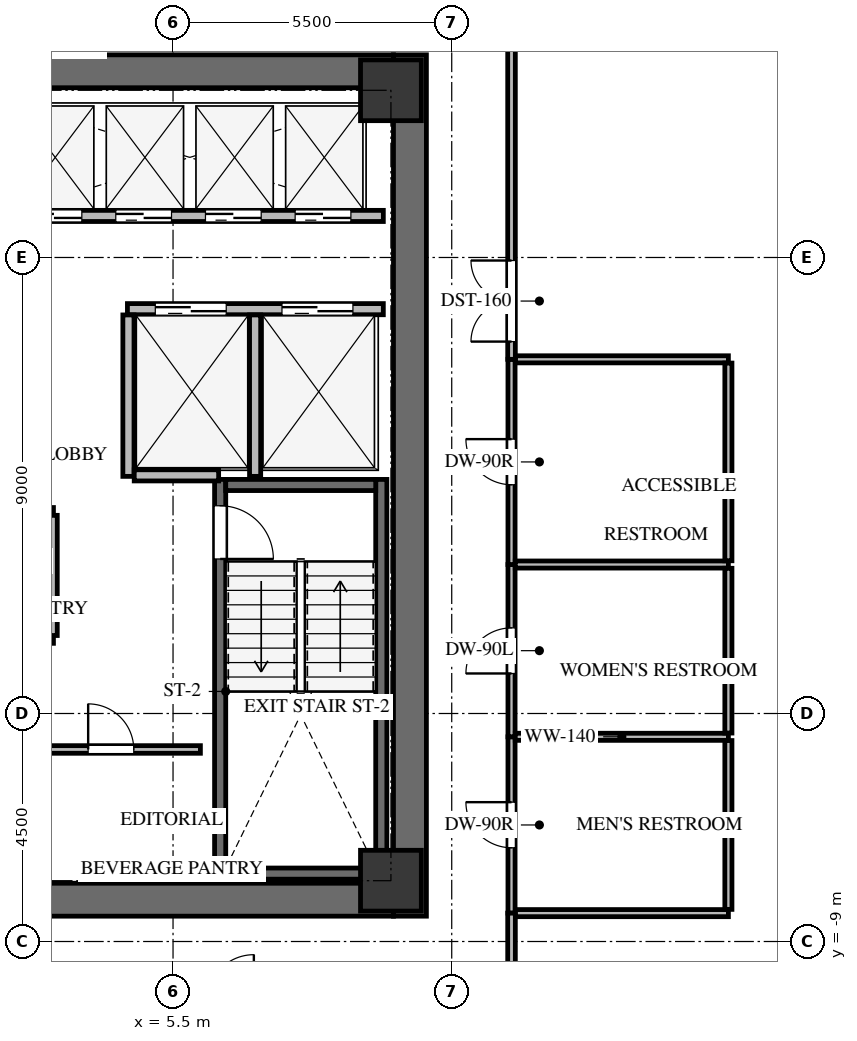
"""IFC4 building model, lengths in metres.
Left out: names, types, materials, properties, quantities, classifications, styles, units other than length and angle.
Written with IfcOpenShell. Run it as: python <this file> out.ifc"""

import sys

from ifc_helpers import new_model, si_unit, direction, frame, frame_2d, origin, origin_2d, place, context, subcontext, project, spatial, rectangle, extrude, source, transform, mapped, element, fill, save


model = new_model("IFC4")
c1 = context("Model", 3, precision=1e-05, world=origin(), true_north=direction((0.0, 1.0)))
c2 = subcontext(c1, "Body", "Model", "MODEL_VIEW")
j1 = project(units=[si_unit("LENGTHUNIT", "METRE"), si_unit("PLANEANGLEUNIT", "RADIAN")], contexts=[c1])
p1 = place(None, origin())
s1 = spatial("IfcSite", under=j1, at=p1, CompositionType="ELEMENT")
p2 = place(p1, origin())
s2 = spatial("IfcBuilding", under=s1, at=p2, CompositionType="ELEMENT")
p3 = place(p2, frame((0.0, 0.0, 170.5)))
s3 = spatial("IfcBuildingStorey", under=s2, at=p3, CompositionType="ELEMENT", Elevation=170.5)
p4 = place(p3, frame((10.175, -8.5, 0.0), z_axis=(0.0, 0.0, 1.0), x_axis=(0.0, 1.0, 0.0)))
e1 = element("IfcWall", 1, at=p4, inside=s3, PredefinedType="SHEAR", context=c2, shape_type="SweptSolid", body=[
    extrude(rectangle(XDim=17.0, YDim=0.65, at=frame_2d((8.5, 0.0))), origin(), (0.0, 0.0, 1.0), 3.3),
])
p5 = place(p3, frame((2.1, -8.175, 0.0), z_axis=(0.0, 0.0, 1.0), x_axis=(1.0, 0.0, 0.0)))
e2 = element("IfcWall", 2, at=p5, inside=s3, PredefinedType="SHEAR", context=c2, shape_type="SweptSolid", body=[
    extrude(rectangle(XDim=7.75, YDim=0.65, at=frame_2d((3.875, 0.0))), origin(), (0.0, 0.0, 1.0), 3.3),
])
p6 = place(p3, frame((-9.85, 8.175, 0.0), z_axis=(0.0, 0.0, 1.0), x_axis=(1.0, 0.0, 0.0)))
e3 = element("IfcWall", 3, at=p6, inside=s3, PredefinedType="SHEAR", context=c2, shape_type="SweptSolid", body=[
    extrude(rectangle(XDim=19.7, YDim=0.65, at=frame_2d((9.85, 0.0))), origin(), (0.0, 0.0, 1.0), 3.3),
])
p7 = place(p3, frame((9.61, -7.77, -0.24), z_axis=(0.0, 0.0, 1.0), x_axis=(0.0, 1.0, 0.0)))
e4 = element("IfcWall", 4, at=p7, inside=s3, PredefinedType="SHEAR", context=c2, shape_type="SweptSolid", body=[
    extrude(rectangle(XDim=7.89, YDim=0.22, at=frame_2d((3.945, 0.0))), origin(), (0.0, 0.0, 1.0), 3.3),
])
p8 = place(p3, frame((6.43, 0.12, -0.24), z_axis=(0.0, 0.0, 1.0), x_axis=(0.0, -1.0, 0.0)))
e5 = element("IfcWall", 5, at=p8, inside=s3, PredefinedType="SHEAR", context=c2, shape_type="SweptSolid", body=[
    extrude(rectangle(XDim=7.89, YDim=0.22, at=frame_2d((3.945, 0.0))), origin(), (0.0, 0.0, 1.0), 3.3),
])
p9 = place(p8, frame((0.52, 0.0, 0.0)))
e6 = element("IfcOpeningElement", 6, at=p9, cuts=e5, PredefinedType="OPENING", context=c2, shape_type="SweptSolid", body=[
    extrude(rectangle(XDim=1.05, YDim=2.15, at=frame_2d((0.525, 1.075))), frame((0.0, 0.12, 0.0), z_axis=(0.0, -1.0, 0.0), x_axis=(1.0, 0.0, 0.0)), (0.0, 0.0, 1.0), 0.24),
])
for number, where, z_axis, x_axis in (
    (7, (6.54, -7.66, -0.24), (0.0, 0.0, 1.0), (1.0, 0.0, 0.0)),
    (8, (9.5, 0.01, -0.24), (0.0, 0.0, 1.0), (-1.0, 0.0, 0.0)),
):
    element("IfcWall", number, at=place(p3, frame(where, z_axis=z_axis, x_axis=x_axis)), inside=s3, PredefinedType="SHEAR", context=c2, shape_type="SweptSolid", body=[
        extrude(rectangle(XDim=2.96, YDim=0.22, at=frame_2d((1.48, 0.0))), origin(), (0.0, 0.0, 1.0), 3.3),
    ])
m1 = source(origin(), c2, "Body", "SweptSolid", [
    extrude(rectangle(XDim=1.2, YDim=1.2, at=origin_2d()), origin(), (0.0, 0.0, 1.0), 3.3),
])
for number, where, z_axis, x_axis in (
    (9, (9.8, -7.8, -0.24), (0.0, 0.0, 1.0), (1.0, 0.0, 0.0)),
    (10, (9.8, 7.8, -0.24), (0.0, 0.0, 1.0), (1.0, 0.0, 0.0)),
):
    element("IfcColumn", number, at=place(p3, frame(where, z_axis=z_axis, x_axis=x_axis)), inside=s3, PredefinedType="COLUMN", context=c2, shape_type="MappedRepresentation", body=[
        mapped(m1, transform((0.0, 0.0, 0.0), x_axis=(1.0, 0.0, 0.0), y_axis=(0.0, 1.0, 0.0), z_axis=(0.0, 0.0, 1.0), scale=1.0)),
    ])
p10 = place(p3, frame((4.6, 3.48, 0.0), z_axis=(0.0, 0.0, 1.0), x_axis=(1.0, 0.0, 0.0)))
e11 = element("IfcWall", 11, at=p10, inside=s3, PredefinedType="SOLIDWALL", context=c2, shape_type="SweptSolid", body=[
    extrude(rectangle(XDim=5.05, YDim=0.22, at=frame_2d((2.525, 0.0))), origin(), (0.0, 0.0, 1.0), 3.045),
])
p11 = place(p10, frame((0.55, 0.0, 0.0)))
e12 = element("IfcOpeningElement", 12, at=p11, cuts=e11, PredefinedType="OPENING", context=c2, shape_type="SweptSolid", body=[
    extrude(rectangle(XDim=1.4, YDim=2.15, at=frame_2d((0.7, 1.075))), frame((0.0, 0.12, 0.0), z_axis=(0.0, -1.0, 0.0), x_axis=(1.0, 0.0, 0.0)), (0.0, 0.0, 1.0), 0.24),
])
p12 = place(p10, frame((3.05, 0.0, 0.0)))
e13 = element("IfcOpeningElement", 13, at=p12, cuts=e11, PredefinedType="OPENING", context=c2, shape_type="SweptSolid", body=[
    extrude(rectangle(XDim=1.4, YDim=2.15, at=frame_2d((0.7, 1.075))), frame((0.0, 0.12, 0.0), z_axis=(0.0, -1.0, 0.0), x_axis=(1.0, 0.0, 0.0)), (0.0, 0.0, 1.0), 0.24),
])
for number, where, z_axis, x_axis in (
    (14, (4.62, 0.18, 0.0), (0.0, 0.0, 1.0), (0.0, 1.0, 0.0)),
    (15, (7.12, 0.18, 0.0), (0.0, 0.0, 1.0), (0.0, 1.0, 0.0)),
):
    element("IfcWall", number, at=place(p3, frame(where, z_axis=z_axis, x_axis=x_axis)), inside=s3, PredefinedType="SOLIDWALL", context=c2, shape_type="SweptSolid", body=[
        extrude(rectangle(XDim=3.186, YDim=0.22, at=frame_2d((1.593, 0.0))), origin(), (0.0, 0.0, 1.0), 3.045),
    ])
p13 = place(p3, frame((4.734, 0.2, 0.0), z_axis=(0.0, 0.0, 1.0), x_axis=(1.0, 0.0, 0.0)))
e16 = element("IfcWall", 16, at=p13, inside=s3, PredefinedType="SOLIDWALL", context=c2, shape_type="SweptSolid", body=[
    extrude(rectangle(XDim=1.666, YDim=0.22, at=frame_2d((0.833, 0.0))), origin(), (0.0, 0.0, 1.0), 3.045),
])
p14 = place(p3, frame((2.325, 5.32, 0.0), z_axis=(0.0, 0.0, 1.0), x_axis=(1.0, 0.0, 0.0)))
e17 = element("IfcWall", 17, at=p14, inside=s3, PredefinedType="SOLIDWALL", context=c2, shape_type="SweptSolid", body=[
    extrude(rectangle(XDim=7.325, YDim=0.22, at=frame_2d((3.663, 0.0))), origin(), (0.0, 0.0, 1.0), 3.045),
])
p15 = place(p14, frame((0.275, 0.0, 0.0)))
e18 = element("IfcOpeningElement", 18, at=p15, cuts=e17, PredefinedType="OPENING", context=c2, shape_type="SweptSolid", body=[
    extrude(rectangle(XDim=1.1, YDim=2.15, at=frame_2d((0.55, 1.075))), frame((0.0, 0.12, 0.0), z_axis=(0.0, -1.0, 0.0), x_axis=(1.0, 0.0, 0.0)), (0.0, 0.0, 1.0), 0.24),
])
p16 = place(p14, frame((2.045, 0.0, 0.0)))
e19 = element("IfcOpeningElement", 19, at=p16, cuts=e17, PredefinedType="OPENING", context=c2, shape_type="SweptSolid", body=[
    extrude(rectangle(XDim=1.1, YDim=2.15, at=frame_2d((0.55, 1.075))), frame((0.0, 0.12, 0.0), z_axis=(0.0, -1.0, 0.0), x_axis=(1.0, 0.0, 0.0)), (0.0, 0.0, 1.0), 0.24),
])
p17 = place(p14, frame((3.815, 0.0, 0.0)))
e20 = element("IfcOpeningElement", 20, at=p17, cuts=e17, PredefinedType="OPENING", context=c2, shape_type="SweptSolid", body=[
    extrude(rectangle(XDim=1.1, YDim=2.15, at=frame_2d((0.55, 1.075))), frame((0.0, 0.12, 0.0), z_axis=(0.0, -1.0, 0.0), x_axis=(1.0, 0.0, 0.0)), (0.0, 0.0, 1.0), 0.24),
])
p18 = place(p14, frame((5.585, 0.0, 0.0)))
e21 = element("IfcOpeningElement", 21, at=p18, cuts=e17, PredefinedType="OPENING", context=c2, shape_type="SweptSolid", body=[
    extrude(rectangle(XDim=1.1, YDim=2.15, at=frame_2d((0.55, 1.075))), frame((0.0, 0.12, 0.0), z_axis=(0.0, -1.0, 0.0), x_axis=(1.0, 0.0, 0.0)), (0.0, 0.0, 1.0), 0.24),
])
p19 = place(p3, frame((2.51, -5.21, 0.0), z_axis=(0.0, 0.0, 1.0), x_axis=(1.0, 0.0, 0.0)))
e22 = element("IfcWall", 22, at=p19, inside=s3, PredefinedType="PARTITIONING", context=c2, shape_type="SweptSolid", body=[
    extrude(rectangle(XDim=3.53, YDim=0.15, at=frame_2d((1.765, 0.0))), origin(), (0.0, 0.0, 1.0), 3.045),
])
p20 = place(p19, frame((1.315, 0.0, 0.0)))
e23 = element("IfcOpeningElement", 23, at=p20, cuts=e22, PredefinedType="OPENING", context=c2, shape_type="SweptSolid", body=[
    extrude(rectangle(XDim=0.9, YDim=2.05, at=frame_2d((0.45, 1.025))), frame((0.0, 0.085, 0.0), z_axis=(0.0, -1.0, 0.0), x_axis=(1.0, 0.0, 0.0)), (0.0, 0.0, 1.0), 0.17),
])
p21 = place(p3, frame((3.14, -3.04, 0.0), z_axis=(0.0, 0.0, 1.0), x_axis=(-1.0, 0.0, 0.0)))
e24 = element("IfcWall", 24, at=p21, inside=s3, PredefinedType="PARTITIONING", context=c2, shape_type="SweptSolid", body=[
    extrude(rectangle(XDim=7.48, YDim=0.15, at=frame_2d((3.74, 0.0))), origin(), (0.0, 0.0, 1.0), 3.045),
])
p22 = place(p21, frame((3.29, 0.0, 0.0)))
e25 = element("IfcOpeningElement", 25, at=p22, cuts=e24, PredefinedType="OPENING", context=c2, shape_type="SweptSolid", body=[
    extrude(rectangle(XDim=0.9, YDim=2.05, at=frame_2d((0.45, 1.025))), frame((0.0, 0.085, 0.0), z_axis=(0.0, -1.0, 0.0), x_axis=(1.0, 0.0, 0.0)), (0.0, 0.0, 1.0), 0.17),
])
p23 = place(p3, frame((-4.34, -0.51, 0.0), z_axis=(0.0, 0.0, 1.0), x_axis=(1.0, 0.0, 0.0)))
e26 = element("IfcWall", 26, at=p23, inside=s3, PredefinedType="PARTITIONING", context=c2, shape_type="SweptSolid", body=[
    extrude(rectangle(XDim=7.48, YDim=0.15, at=frame_2d((3.74, 0.0))), origin(), (0.0, 0.0, 1.0), 3.045),
])
p24 = place(p3, frame((3.14, -0.589, 0.0), z_axis=(0.0, 0.0, 1.0), x_axis=(0.0, -1.0, 0.0)))
e27 = element("IfcWall", 27, at=p24, inside=s3, PredefinedType="PARTITIONING", context=c2, shape_type="SweptSolid", body=[
    extrude(rectangle(XDim=2.372, YDim=0.15, at=frame_2d((1.186, 0.0))), origin(), (0.0, 0.0, 1.0), 3.045),
])
p25 = place(p3, frame((12.18, -8.44, 0.0), z_axis=(0.0, 0.0, 1.0), x_axis=(0.0, 1.0, 0.0)))
e28 = element("IfcWall", 28, at=p25, inside=s3, PredefinedType="PARTITIONING", context=c2, shape_type="SweptSolid", body=[
    extrude(rectangle(XDim=3.48, YDim=0.14, at=frame_2d((1.74, 0.0))), origin(), (0.0, 0.0, 1.0), 3.045),
])
p26 = place(p25, frame((1.29, 0.0, 0.0)))
e29 = element("IfcOpeningElement", 29, at=p26, cuts=e28, PredefinedType="OPENING", context=c2, shape_type="SweptSolid", body=[
    extrude(rectangle(XDim=0.9, YDim=2.05, at=frame_2d((0.45, 1.025))), frame((0.0, 0.08, 0.0), z_axis=(0.0, -1.0, 0.0), x_axis=(1.0, 0.0, 0.0)), (0.0, 0.0, 1.0), 0.16),
])
p27 = place(p3, frame((12.18, -4.96, 0.0), z_axis=(0.0, 0.0, 1.0), x_axis=(0.0, 1.0, 0.0)))
e30 = element("IfcWall", 30, at=p27, inside=s3, PredefinedType="PARTITIONING", context=c2, shape_type="SweptSolid", body=[
    extrude(rectangle(XDim=3.4, YDim=0.14, at=frame_2d((1.7, 0.0))), origin(), (0.0, 0.0, 1.0), 3.045),
])
p28 = place(p27, frame((1.25, 0.0, 0.0)))
e31 = element("IfcOpeningElement", 31, at=p28, cuts=e30, PredefinedType="OPENING", context=c2, shape_type="SweptSolid", body=[
    extrude(rectangle(XDim=0.9, YDim=2.05, at=frame_2d((0.45, 1.025))), frame((0.0, 0.08, 0.0), z_axis=(0.0, -1.0, 0.0), x_axis=(1.0, 0.0, 0.0)), (0.0, 0.0, 1.0), 0.16),
])
p29 = place(p3, frame((12.18, -1.56, 0.0), z_axis=(0.0, 0.0, 1.0), x_axis=(0.0, 1.0, 0.0)))
e32 = element("IfcWall", 32, at=p29, inside=s3, PredefinedType="PARTITIONING", context=c2, shape_type="SweptSolid", body=[
    extrude(rectangle(XDim=4.05, YDim=0.14, at=frame_2d((2.025, 0.0))), origin(), (0.0, 0.0, 1.0), 2.242),
])
p30 = place(p29, frame((1.575, 0.0, 0.0)))
e33 = element("IfcOpeningElement", 33, at=p30, cuts=e32, PredefinedType="OPENING", context=c2, shape_type="SweptSolid", body=[
    extrude(rectangle(XDim=0.9, YDim=2.05, at=frame_2d((0.45, 1.025))), frame((0.0, 0.08, 0.0), z_axis=(0.0, -1.0, 0.0), x_axis=(1.0, 0.0, 0.0)), (0.0, 0.0, 1.0), 0.16),
])
p31 = place(p3, frame((12.18, 2.49, 0.0), z_axis=(0.0, 0.0, 1.0), x_axis=(0.0, 1.0, 0.0)))
e34 = element("IfcWall", 34, at=p31, inside=s3, PredefinedType="PARTITIONING", context=c2, shape_type="SweptSolid", body=[
    extrude(rectangle(XDim=7.611, YDim=0.15, at=frame_2d((3.806, 0.0))), origin(), (0.0, 0.0, 1.0), 3.045),
])
p32 = place(p31, frame((0.35, 0.0, 0.0)))
e35 = element("IfcOpeningElement", 35, at=p32, cuts=e34, PredefinedType="OPENING", context=c2, shape_type="SweptSolid", body=[
    extrude(rectangle(XDim=1.6, YDim=2.15, at=frame_2d((0.8, 1.075))), frame((0.0, 0.085, 0.0), z_axis=(0.0, -1.0, 0.0), x_axis=(1.0, 0.0, 0.0)), (0.0, 0.0, 1.0), 0.17),
])
p33 = place(p3, frame((12.18, -10.101, 0.0), z_axis=(0.0, 0.0, 1.0), x_axis=(0.0, 1.0, 0.0)))
e36 = element("IfcWall", 36, at=p33, inside=s3, PredefinedType="PARTITIONING", context=c2, shape_type="SweptSolid", body=[
    extrude(rectangle(XDim=1.661, YDim=0.15, at=frame_2d((0.831, 0.0))), origin(), (0.0, 0.0, 1.0), 3.045),
])
p34 = place(p3, frame((12.254, -4.96, 0.0), z_axis=(0.0, 0.0, 1.0), x_axis=(1.0, 0.0, 0.0)))
e37 = element("IfcWall", 37, at=p34, inside=s3, PredefinedType="PARTITIONING", context=c2, shape_type="SweptSolid", body=[
    extrude(rectangle(XDim=4.206, YDim=0.14, at=frame_2d((2.103, 0.0))), origin(), (0.0, 0.0, 1.0), 3.045),
])
p35 = place(p3, frame((16.46, -8.44, 0.0), z_axis=(0.0, 0.0, 1.0), x_axis=(-1.0, 0.0, 0.0)))
e38 = element("IfcWall", 38, at=p35, inside=s3, PredefinedType="PARTITIONING", context=c2, shape_type="SweptSolid", body=[
    extrude(rectangle(XDim=4.201, YDim=0.14, at=frame_2d((2.101, 0.0))), origin(), (0.0, 0.0, 1.0), 3.045),
])
p36 = place(p3, frame((16.46, -5.034, 0.0), z_axis=(0.0, 0.0, 1.0), x_axis=(0.0, -1.0, 0.0)))
e39 = element("IfcWall", 39, at=p36, inside=s3, PredefinedType="PARTITIONING", context=c2, shape_type="SweptSolid", body=[
    extrude(rectangle(XDim=3.332, YDim=0.14, at=frame_2d((1.666, 0.0))), origin(), (0.0, 0.0, 1.0), 3.045),
])
p37 = place(p3, frame((12.254, -1.56, 0.0), z_axis=(0.0, 0.0, 1.0), x_axis=(1.0, 0.0, 0.0)))
e40 = element("IfcWall", 40, at=p37, inside=s3, PredefinedType="PARTITIONING", context=c2, shape_type="SweptSolid", body=[
    extrude(rectangle(XDim=4.206, YDim=0.14, at=frame_2d((2.103, 0.0))), origin(), (0.0, 0.0, 1.0), 3.045),
])
p38 = place(p3, frame((16.46, -1.634, 0.0), z_axis=(0.0, 0.0, 1.0), x_axis=(0.0, -1.0, 0.0)))
e41 = element("IfcWall", 41, at=p38, inside=s3, PredefinedType="PARTITIONING", context=c2, shape_type="SweptSolid", body=[
    extrude(rectangle(XDim=3.252, YDim=0.14, at=frame_2d((1.626, 0.0))), origin(), (0.0, 0.0, 1.0), 3.045),
])
p39 = place(p3, frame((12.259, 2.49, 0.0), z_axis=(0.0, 0.0, 1.0), x_axis=(1.0, 0.0, 0.0)))
e42 = element("IfcWall", 42, at=p39, inside=s3, PredefinedType="PARTITIONING", context=c2, shape_type="SweptSolid", body=[
    extrude(rectangle(XDim=4.201, YDim=0.14, at=frame_2d((2.101, 0.0))), origin(), (0.0, 0.0, 1.0), 3.045),
])
p40 = place(p3, frame((16.46, 2.416, 0.0), z_axis=(0.0, 0.0, 1.0), x_axis=(0.0, -1.0, 0.0)))
e43 = element("IfcWall", 43, at=p40, inside=s3, PredefinedType="PARTITIONING", context=c2, shape_type="SweptSolid", body=[
    extrude(rectangle(XDim=3.902, YDim=0.14, at=frame_2d((1.951, 0.0))), origin(), (0.0, 0.0, 1.0), 2.242),
])
m2 = source(origin(), c2, "Body", "SweptSolid", [
    extrude(rectangle(XDim=1.05, YDim=2.15, at=frame_2d((0.525, 1.075))), frame((0.0, 0.025, 0.0), z_axis=(0.0, -1.0, 0.0), x_axis=(1.0, 0.0, 0.0)), (0.0, 0.0, 1.0), 0.05),
])
p41 = place(p9, origin())
e44 = element("IfcDoor", 44, at=p41, inside=s3, OperationType="SINGLE_SWING_RIGHT", PredefinedType="DOOR", context=c2, shape_type="MappedRepresentation", body=[
    mapped(m2, transform((0.0, 0.0, 0.0), x_axis=(1.0, 0.0, 0.0), y_axis=(0.0, 1.0, 0.0), z_axis=(0.0, 0.0, 1.0), scale=1.0)),
])
fill(e6, e44)
m3 = source(origin(), c2, "Body", "SweptSolid", [
    extrude(rectangle(XDim=1.4, YDim=2.15, at=frame_2d((0.7, 1.075))), frame((0.0, 0.025, 0.0), z_axis=(0.0, -1.0, 0.0), x_axis=(1.0, 0.0, 0.0)), (0.0, 0.0, 1.0), 0.05),
])
p42 = place(p11, origin())
e45 = element("IfcDoor", 45, at=p42, inside=s3, OperationType="DOUBLE_DOOR_SLIDING", PredefinedType="DOOR", context=c2, shape_type="MappedRepresentation", body=[
    mapped(m3, transform((0.0, 0.0, 0.0), x_axis=(1.0, 0.0, 0.0), y_axis=(0.0, 1.0, 0.0), z_axis=(0.0, 0.0, 1.0), scale=1.0)),
])
fill(e12, e45)
p43 = place(p12, origin())
e46 = element("IfcDoor", 46, at=p43, inside=s3, OperationType="DOUBLE_DOOR_SLIDING", PredefinedType="DOOR", context=c2, shape_type="MappedRepresentation", body=[
    mapped(m3, transform((0.0, 0.0, 0.0), x_axis=(1.0, 0.0, 0.0), y_axis=(0.0, 1.0, 0.0), z_axis=(0.0, 0.0, 1.0), scale=1.0)),
])
fill(e13, e46)
m4 = source(origin(), c2, "Body", "SweptSolid", [
    extrude(rectangle(XDim=1.1, YDim=2.15, at=frame_2d((0.55, 1.075))), frame((0.0, 0.025, 0.0), z_axis=(0.0, -1.0, 0.0), x_axis=(1.0, 0.0, 0.0)), (0.0, 0.0, 1.0), 0.05),
])
p44 = place(p15, origin())
e47 = element("IfcDoor", 47, at=p44, inside=s3, OperationType="DOUBLE_DOOR_SLIDING", PredefinedType="DOOR", context=c2, shape_type="MappedRepresentation", body=[
    mapped(m4, transform((0.0, 0.0, 0.0), x_axis=(1.0, 0.0, 0.0), y_axis=(0.0, 1.0, 0.0), z_axis=(0.0, 0.0, 1.0), scale=1.0)),
])
fill(e18, e47)
p45 = place(p16, origin())
e48 = element("IfcDoor", 48, at=p45, inside=s3, OperationType="DOUBLE_DOOR_SLIDING", PredefinedType="DOOR", context=c2, shape_type="MappedRepresentation", body=[
    mapped(m4, transform((0.0, 0.0, 0.0), x_axis=(1.0, 0.0, 0.0), y_axis=(0.0, 1.0, 0.0), z_axis=(0.0, 0.0, 1.0), scale=1.0)),
])
fill(e19, e48)
p46 = place(p17, origin())
e49 = element("IfcDoor", 49, at=p46, inside=s3, OperationType="DOUBLE_DOOR_SLIDING", PredefinedType="DOOR", context=c2, shape_type="MappedRepresentation", body=[
    mapped(m4, transform((0.0, 0.0, 0.0), x_axis=(1.0, 0.0, 0.0), y_axis=(0.0, 1.0, 0.0), z_axis=(0.0, 0.0, 1.0), scale=1.0)),
])
fill(e20, e49)
p47 = place(p18, origin())
e50 = element("IfcDoor", 50, at=p47, inside=s3, OperationType="DOUBLE_DOOR_SLIDING", PredefinedType="DOOR", context=c2, shape_type="MappedRepresentation", body=[
    mapped(m4, transform((0.0, 0.0, 0.0), x_axis=(1.0, 0.0, 0.0), y_axis=(0.0, 1.0, 0.0), z_axis=(0.0, 0.0, 1.0), scale=1.0)),
])
fill(e21, e50)
m5 = source(origin(), c2, "Body", "SweptSolid", [
    extrude(rectangle(XDim=0.9, YDim=2.05, at=frame_2d((0.45, 1.025))), frame((0.0, 0.025, 0.0), z_axis=(0.0, -1.0, 0.0), x_axis=(1.0, 0.0, 0.0)), (0.0, 0.0, 1.0), 0.05),
])
p48 = place(p20, origin())
e51 = element("IfcDoor", 51, at=p48, inside=s3, OperationType="SINGLE_SWING_LEFT", PredefinedType="DOOR", context=c2, shape_type="MappedRepresentation", body=[
    mapped(m5, transform((0.0, 0.0, 0.0), x_axis=(1.0, 0.0, 0.0), y_axis=(0.0, 1.0, 0.0), z_axis=(0.0, 0.0, 1.0), scale=1.0)),
])
fill(e23, e51)
m6 = source(origin(), c2, "Body", "SweptSolid", [
    extrude(rectangle(XDim=0.9, YDim=2.05, at=frame_2d((0.45, 1.025))), frame((0.0, 0.025, 0.0), z_axis=(0.0, -1.0, 0.0), x_axis=(1.0, 0.0, 0.0)), (0.0, 0.0, 1.0), 0.05),
])
p49 = place(p26, origin())
e52 = element("IfcDoor", 52, at=p49, inside=s3, OperationType="SINGLE_SWING_RIGHT", PredefinedType="DOOR", context=c2, shape_type="MappedRepresentation", body=[
    mapped(m6, transform((0.0, 0.0, 0.0), x_axis=(1.0, 0.0, 0.0), y_axis=(0.0, 1.0, 0.0), z_axis=(0.0, 0.0, 1.0), scale=1.0)),
])
fill(e29, e52)
m7 = source(origin(), c2, "Body", "SweptSolid", [
    extrude(rectangle(XDim=0.9, YDim=2.05, at=frame_2d((0.45, 1.025))), frame((0.0, 0.025, 0.0), z_axis=(0.0, -1.0, 0.0), x_axis=(1.0, 0.0, 0.0)), (0.0, 0.0, 1.0), 0.05),
])
p50 = place(p28, origin())
e53 = element("IfcDoor", 53, at=p50, inside=s3, OperationType="SINGLE_SWING_LEFT", PredefinedType="DOOR", context=c2, shape_type="MappedRepresentation", body=[
    mapped(m7, transform((0.0, 0.0, 0.0), x_axis=(1.0, 0.0, 0.0), y_axis=(0.0, 1.0, 0.0), z_axis=(0.0, 0.0, 1.0), scale=1.0)),
])
fill(e31, e53)
p51 = place(p30, origin())
e54 = element("IfcDoor", 54, at=p51, inside=s3, OperationType="SINGLE_SWING_RIGHT", PredefinedType="DOOR", context=c2, shape_type="MappedRepresentation", body=[
    mapped(m6, transform((0.0, 0.0, 0.0), x_axis=(1.0, 0.0, 0.0), y_axis=(0.0, 1.0, 0.0), z_axis=(0.0, 0.0, 1.0), scale=1.0)),
])
fill(e33, e54)
m8 = source(origin(), c2, "Body", "SweptSolid", [
    extrude(rectangle(XDim=1.6, YDim=2.15, at=frame_2d((0.8, 1.075))), frame((0.0, 0.025, 0.0), z_axis=(0.0, -1.0, 0.0), x_axis=(1.0, 0.0, 0.0)), (0.0, 0.0, 1.0), 0.05),
])
p52 = place(p32, origin())
e55 = element("IfcDoor", 55, at=p52, inside=s3, OperationType="DOUBLE_DOOR_SINGLE_SWING", PredefinedType="DOOR", context=c2, shape_type="MappedRepresentation", body=[
    mapped(m8, transform((0.0, 0.0, 0.0), x_axis=(1.0, 0.0, 0.0), y_axis=(0.0, 1.0, 0.0), z_axis=(0.0, 0.0, 1.0), scale=1.0)),
])
fill(e35, e55)
save(model, sys.argv[1])
